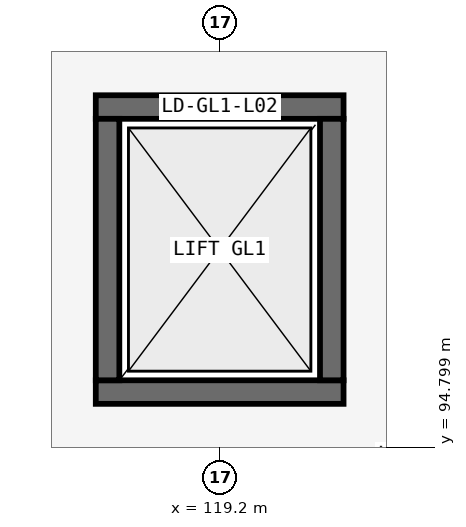
"""IFC4 building model, lengths in metres.
Left out: names, types, materials, properties, quantities, classifications, styles, units other than length and angle.
Written with IfcOpenShell. Run it as: python <this file> out.ifc"""

import sys

from ifc_helpers import new_model, si_unit, direction, frame, frame_2d, origin, place, context, subcontext, project, spatial, rectangle, extrude, element, fill, save


model = new_model("IFC4")
c1 = context("Model", 3, precision=1e-05, world=origin(), true_north=direction((0.0, 1.0)))
c2 = subcontext(c1, "Body", "Model", "MODEL_VIEW")
j1 = project(units=[si_unit("LENGTHUNIT", "METRE"), si_unit("PLANEANGLEUNIT", "RADIAN")], contexts=[c1])
p1 = place(None, origin())
s1 = spatial("IfcSite", under=j1, at=p1, CompositionType="ELEMENT")
p2 = place(p1, origin())
s2 = spatial("IfcBuilding", under=s1, at=p2, CompositionType="ELEMENT")
p3 = place(p2, frame((0.0, 0.0, 9.9)))
s3 = spatial("IfcBuildingStorey", under=s2, at=p3, CompositionType="ELEMENT", Elevation=9.9)
p4 = place(p3, frame((117.57, 95.525, 0.0), z_axis=(0.0, 0.0, 1.0), x_axis=(1.0, 0.0, 0.0)))
e1 = element("IfcWall", 1, at=p4, inside=s3, PredefinedType="SHEAR", context=c2, shape_type="SweptSolid", body=[
    extrude(rectangle(XDim=3.26, YDim=0.31, at=frame_2d((1.63, 0.0))), origin(), (0.0, 0.0, 1.0), 4.2),
])
p5 = place(p3, frame((117.57, 99.275, 0.0), z_axis=(0.0, 0.0, 1.0), x_axis=(1.0, 0.0, 0.0)))
e2 = element("IfcWall", 2, at=p5, inside=s3, PredefinedType="SHEAR", context=c2, shape_type="SweptSolid", body=[
    extrude(rectangle(XDim=3.26, YDim=0.31, at=frame_2d((1.63, 0.0))), origin(), (0.0, 0.0, 1.0), 4.2),
])
p6 = place(p5, frame((0.88, 0.0, 0.0)))
e3 = element("IfcOpeningElement", 3, at=p6, cuts=e2, PredefinedType="OPENING", context=c2, shape_type="SweptSolid", body=[
    extrude(rectangle(XDim=1.5, YDim=2.35, at=frame_2d((0.75, 1.175))), frame((0.0, 0.165, 0.0), z_axis=(0.0, -1.0, 0.0), x_axis=(1.0, 0.0, 0.0)), (0.0, 0.0, 1.0), 0.33),
])
for number, where, z_axis, x_axis in (
    (4, (117.725, 95.68, 0.0), (0.0, 0.0, 1.0), (0.0, 1.0, 0.0)),
    (5, (120.675, 95.68, 0.0), (0.0, 0.0, 1.0), (0.0, 1.0, 0.0)),
):
    element("IfcWall", number, at=place(p3, frame(where, z_axis=z_axis, x_axis=x_axis)), inside=s3, PredefinedType="SHEAR", context=c2, shape_type="SweptSolid", body=[
        extrude(rectangle(XDim=3.44, YDim=0.31, at=frame_2d((1.72, 0.0))), origin(), (0.0, 0.0, 1.0), 4.2),
    ])
p7 = place(p6, origin())
e6 = element("IfcDoor", 6, at=p7, inside=s3, OperationType="SLIDING_TO_LEFT", PredefinedType="DOOR", context=c2, shape_type="SweptSolid", body=[
    extrude(rectangle(XDim=1.5, YDim=2.35, at=frame_2d((0.75, 1.175))), frame((0.0, 0.025, 0.0), z_axis=(0.0, -1.0, 0.0), x_axis=(1.0, 0.0, 0.0)), (0.0, 0.0, 1.0), 0.05),
])
fill(e3, e6)
save(model, sys.argv[1])
